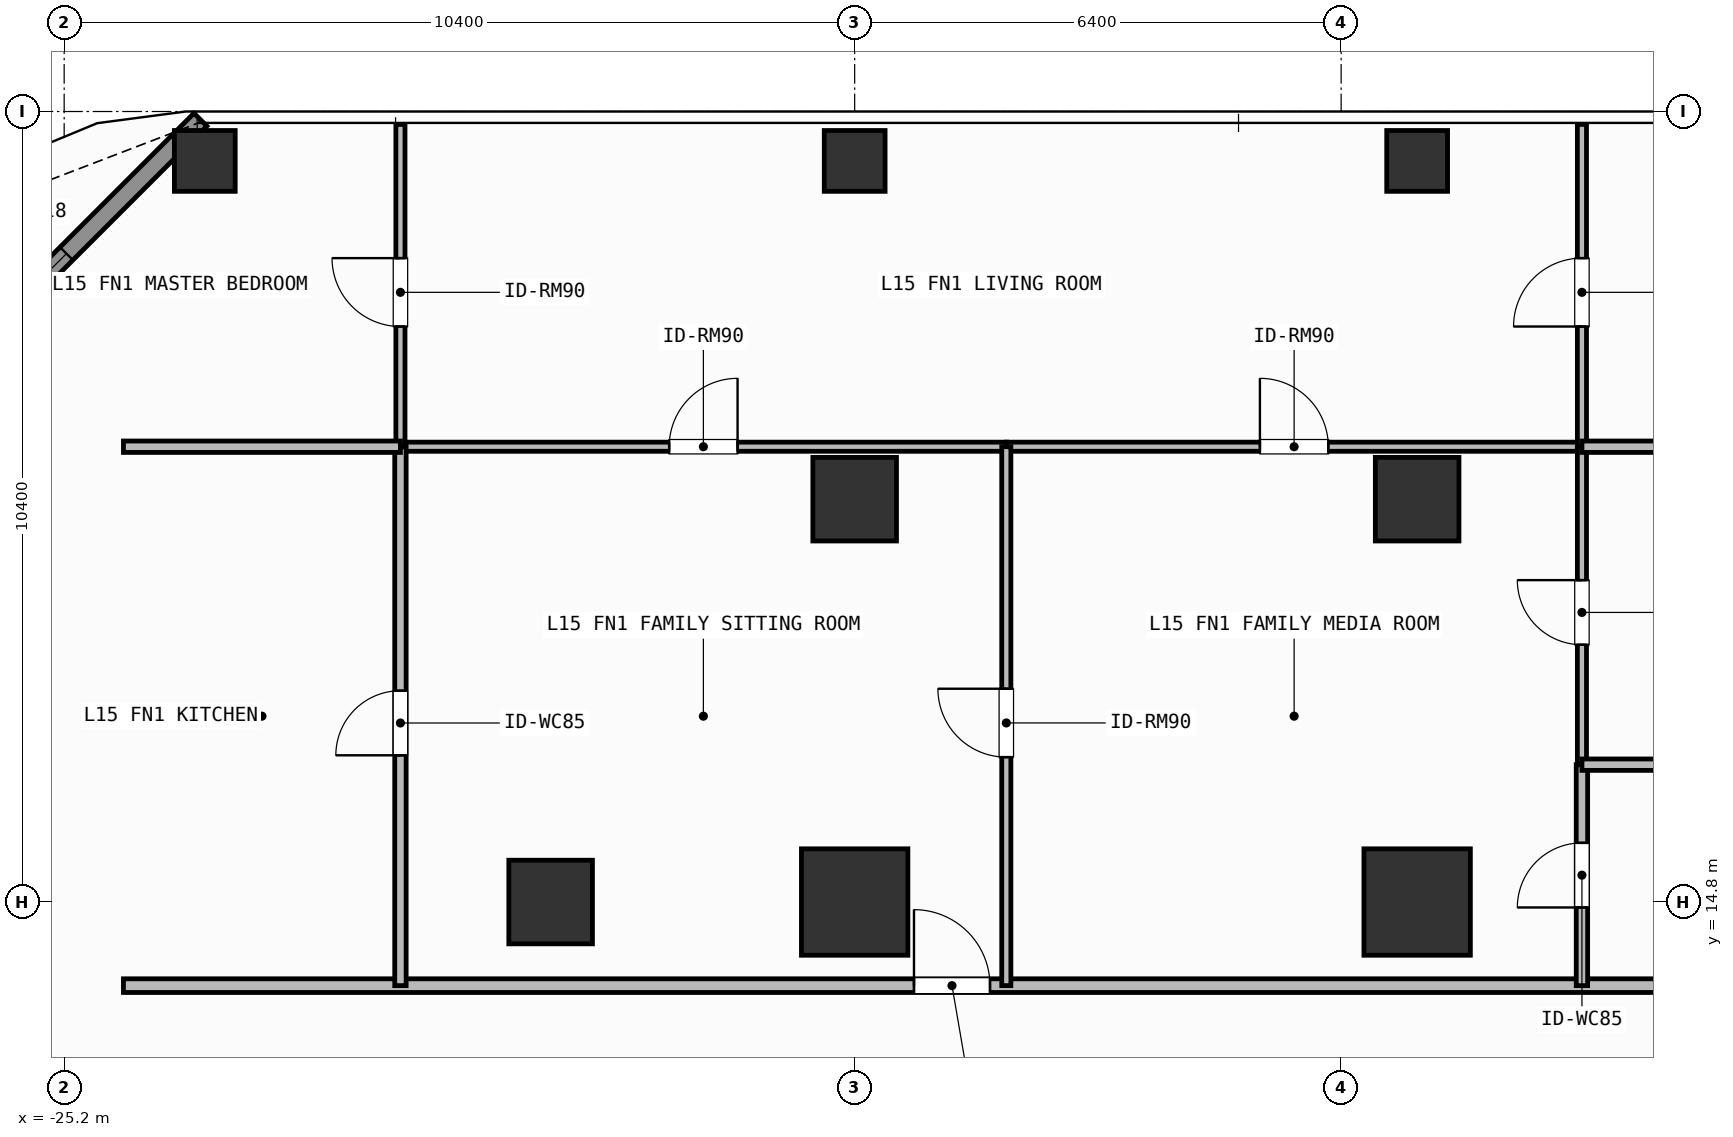
"""IFC4 building model, lengths in metres.
Left out: names, types, materials, properties, quantities, classifications, styles, units other than length and angle.
Written with IfcOpenShell. Run it as: python <this file> out.ifc"""

import sys

from ifc_helpers import new_model, si_unit, direction, frame, frame_2d, origin, origin_2d, place, context, subcontext, project, spatial, rectangle, hollow_rectangle, extrude, element, fill, save


model = new_model("IFC4")
c1 = context("Model", 3, precision=1e-05, world=origin(), true_north=direction((0.0, 1.0)))
c2 = subcontext(c1, "Body", "Model", "MODEL_VIEW")
j1 = project(units=[si_unit("LENGTHUNIT", "METRE"), si_unit("PLANEANGLEUNIT", "RADIAN")], contexts=[c1])
p1 = place(None, origin())
s1 = spatial("IfcSite", under=j1, at=p1, CompositionType="ELEMENT")
p2 = place(p1, origin())
s2 = spatial("IfcBuilding", under=s1, at=p2, CompositionType="ELEMENT")
p3 = place(p2, frame((0.0, 0.0, 57.9)))
s3 = spatial("IfcBuildingStorey", under=s2, at=p3, CompositionType="ELEMENT", Elevation=57.9)
for number, where, z_axis, x_axis in (
    (1, (-14.8, 14.8, 0.0), (0.0, 0.0, 1.0), (1.0, 0.0, 0.0)),
    (2, (-7.4, 14.8, 0.0), (0.0, 0.0, 1.0), (1.0, 0.0, 0.0)),
):
    element("IfcColumn", number, at=place(p3, frame(where, z_axis=z_axis, x_axis=x_axis)), inside=s3, PredefinedType="COLUMN", context=c2, shape_type="SweptSolid", body=[
        extrude(rectangle(XDim=1.4, YDim=1.4, at=origin_2d()), origin(), (0.0, 0.0, 1.0), 3.9),
    ])
for number, where, z_axis, x_axis in (
    (3, (-18.8, 14.8, 0.0), (0.0, 0.0, 1.0), (1.0, 0.0, 0.0)),
    (4, (-14.8, 20.1, 0.0), (0.0, 0.0, 1.0), (1.0, 0.0, 0.0)),
    (5, (-7.4, 20.1, 0.0), (0.0, 0.0, 1.0), (1.0, 0.0, 0.0)),
):
    element("IfcColumn", number, at=place(p3, frame(where, z_axis=z_axis, x_axis=x_axis)), inside=s3, PredefinedType="COLUMN", context=c2, shape_type="SweptSolid", body=[
        extrude(rectangle(XDim=1.1, YDim=1.1, at=origin_2d()), origin(), (0.0, 0.0, 1.0), 3.9),
    ])
for number, where, z_axis, x_axis in (
    (6, (-23.35, 24.55, 0.0), (0.0, 0.0, 1.0), (1.0, 0.0, 0.0)),
    (7, (-14.8, 24.55, 0.0), (0.0, 0.0, 1.0), (1.0, 0.0, 0.0)),
    (8, (-7.4, 24.55, 0.0), (0.0, 0.0, 1.0), (1.0, 0.0, 0.0)),
):
    element("IfcColumn", number, at=place(p3, frame(where, z_axis=z_axis, x_axis=x_axis)), inside=s3, PredefinedType="COLUMN", context=c2, shape_type="SweptSolid", body=[
        extrude(hollow_rectangle(XDim=0.8, YDim=0.8, WallThickness=0.036, at=origin_2d()), origin(), (0.0, 0.0, 1.0), 3.9),
    ])
p4 = place(p3, frame((-27.992, 20.508, 0.0), z_axis=(0.0, 0.0, 1.0), x_axis=(0.707106781187, 0.707106781187, 0.0)))
e9 = element("IfcWall", 9, at=p4, inside=s3, PredefinedType="SOLIDWALL", context=c2, shape_type="SweptSolid", body=[
    extrude(rectangle(XDim=6.484, YDim=0.24, at=frame_2d((3.242, 0.0))), origin(), (0.0, 0.0, 1.0), 3.68),
])
p5 = place(p4, frame((2.492, 0.0, 0.8)))
e10 = element("IfcOpeningElement", 10, at=p5, cuts=e9, PredefinedType="OPENING", context=c2, shape_type="SweptSolid", body=[
    extrude(rectangle(XDim=1.5, YDim=1.85, at=frame_2d((0.75, 0.925))), frame((0.0, 0.13, 0.0), z_axis=(0.0, -1.0, 0.0), x_axis=(1.0, 0.0, 0.0)), (0.0, 0.0, 1.0), 0.26),
])
p6 = place(p3, frame((-24.42, 13.7, 0.0), z_axis=(0.0, 0.0, 1.0), x_axis=(1.0, 0.0, 0.0)))
e11 = element("IfcWall", 11, at=p6, inside=s3, PredefinedType="PARTITIONING", context=c2, shape_type="SweptSolid", body=[
    extrude(rectangle(XDim=25.394, YDim=0.18, at=frame_2d((12.697, 0.0))), origin(), (0.0, 0.0, 1.0), 3.68),
])
p7 = place(p6, frame((10.4, 0.0, 0.0)))
e12 = element("IfcOpeningElement", 12, at=p7, cuts=e11, PredefinedType="OPENING", context=c2, shape_type="SweptSolid", body=[
    extrude(rectangle(XDim=1.0, YDim=2.2, at=frame_2d((0.5, 1.1))), frame((0.0, 0.1, 0.0), z_axis=(0.0, -1.0, 0.0), x_axis=(1.0, 0.0, 0.0)), (0.0, 0.0, 1.0), 0.2),
])
p8 = place(p3, frame((-20.776, 20.79, 0.0), z_axis=(0.0, 0.0, 1.0), x_axis=(1.0, 0.0, 0.0)))
e13 = element("IfcWall", 13, at=p8, inside=s3, PredefinedType="PARTITIONING", context=c2, shape_type="SweptSolid", body=[
    extrude(rectangle(XDim=7.971, YDim=0.12, at=frame_2d((3.985, 0.0))), origin(), (0.0, 0.0, 1.0), 3.68),
])
p9 = place(p8, frame((3.535, 0.0, 0.0)))
e14 = element("IfcOpeningElement", 14, at=p9, cuts=e13, PredefinedType="OPENING", context=c2, shape_type="SweptSolid", body=[
    extrude(rectangle(XDim=0.9, YDim=2.1, at=frame_2d((0.45, 1.05))), frame((0.0, 0.07, 0.0), z_axis=(0.0, -1.0, 0.0), x_axis=(1.0, 0.0, 0.0)), (0.0, 0.0, 1.0), 0.14),
])
p10 = place(p3, frame((-12.805, 20.79, 0.0), z_axis=(0.0, 0.0, 1.0), x_axis=(1.0, 0.0, 0.0)))
e15 = element("IfcWall", 15, at=p10, inside=s3, PredefinedType="PARTITIONING", context=c2, shape_type="SweptSolid", body=[
    extrude(rectangle(XDim=7.573, YDim=0.12, at=frame_2d((3.787, 0.0))), origin(), (0.0, 0.0, 1.0), 3.68),
])
p11 = place(p10, frame((3.336, 0.0, 0.0)))
e16 = element("IfcOpeningElement", 16, at=p11, cuts=e15, PredefinedType="OPENING", context=c2, shape_type="SweptSolid", body=[
    extrude(rectangle(XDim=0.9, YDim=2.1, at=frame_2d((0.45, 1.05))), frame((0.0, 0.07, 0.0), z_axis=(0.0, -1.0, 0.0), x_axis=(1.0, 0.0, 0.0)), (0.0, 0.0, 1.0), 0.14),
])
p12 = place(p3, frame((-12.805, 13.7, 0.0), z_axis=(0.0, 0.0, 1.0), x_axis=(0.0, 1.0, 0.0)))
e17 = element("IfcWall", 17, at=p12, inside=s3, PredefinedType="PARTITIONING", context=c2, shape_type="SweptSolid", body=[
    extrude(rectangle(XDim=7.09, YDim=0.12, at=frame_2d((3.545, 0.0))), origin(), (0.0, 0.0, 1.0), 3.68),
])
p13 = place(p12, frame((3.006, 0.0, 0.0)))
e18 = element("IfcOpeningElement", 18, at=p13, cuts=e17, PredefinedType="OPENING", context=c2, shape_type="SweptSolid", body=[
    extrude(rectangle(XDim=0.9, YDim=2.1, at=frame_2d((0.45, 1.05))), frame((0.0, 0.07, 0.0), z_axis=(0.0, -1.0, 0.0), x_axis=(1.0, 0.0, 0.0)), (0.0, 0.0, 1.0), 0.14),
])
p14 = place(p3, frame((-20.776, 13.7, 0.0), z_axis=(0.0, 0.0, 1.0), x_axis=(0.0, 1.0, 0.0)))
e19 = element("IfcWall", 19, at=p14, inside=s3, PredefinedType="PARTITIONING", context=c2, shape_type="SweptSolid", body=[
    extrude(rectangle(XDim=7.09, YDim=0.15, at=frame_2d((3.545, 0.0))), origin(), (0.0, 0.0, 1.0), 3.68),
])
p15 = place(p14, frame((3.03, 0.0, 0.0)))
e20 = element("IfcOpeningElement", 20, at=p15, cuts=e19, PredefinedType="OPENING", context=c2, shape_type="SweptSolid", body=[
    extrude(rectangle(XDim=0.85, YDim=2.1, at=frame_2d((0.425, 1.05))), frame((0.0, 0.085, 0.0), z_axis=(0.0, -1.0, 0.0), x_axis=(1.0, 0.0, 0.0)), (0.0, 0.0, 1.0), 0.17),
])
p16 = place(p3, frame((-20.776, 20.79, 0.0), z_axis=(0.0, 0.0, 1.0), x_axis=(0.0, 1.0, 0.0)))
e21 = element("IfcWall", 21, at=p16, inside=s3, PredefinedType="PARTITIONING", context=c2, shape_type="SweptSolid", body=[
    extrude(rectangle(XDim=4.24, YDim=0.12, at=frame_2d((2.12, 0.0))), origin(), (0.0, 0.0, 1.0), 3.68),
])
p17 = place(p16, frame((1.581, 0.0, 0.0)))
e22 = element("IfcOpeningElement", 22, at=p17, cuts=e21, PredefinedType="OPENING", context=c2, shape_type="SweptSolid", body=[
    extrude(rectangle(XDim=0.9, YDim=2.1, at=frame_2d((0.45, 1.05))), frame((0.0, 0.07, 0.0), z_axis=(0.0, -1.0, 0.0), x_axis=(1.0, 0.0, 0.0)), (0.0, 0.0, 1.0), 0.14),
])
p18 = place(p3, frame((-5.232, 13.7, 0.0), z_axis=(0.0, 0.0, 1.0), x_axis=(0.0, 1.0, 0.0)))
e23 = element("IfcWall", 23, at=p18, inside=s3, PredefinedType="PARTITIONING", context=c2, shape_type="SweptSolid", body=[
    extrude(rectangle(XDim=2.907, YDim=0.15, at=frame_2d((1.454, 0.0))), origin(), (0.0, 0.0, 1.0), 3.68),
])
p19 = place(p18, frame((1.029, 0.0, 0.0)))
e24 = element("IfcOpeningElement", 24, at=p19, cuts=e23, PredefinedType="OPENING", context=c2, shape_type="SweptSolid", body=[
    extrude(rectangle(XDim=0.85, YDim=2.1, at=frame_2d((0.425, 1.05))), frame((0.0, 0.085, 0.0), z_axis=(0.0, -1.0, 0.0), x_axis=(1.0, 0.0, 0.0)), (0.0, 0.0, 1.0), 0.17),
])
p20 = place(p3, frame((-5.232, 16.607, 0.0), z_axis=(0.0, 0.0, 1.0), x_axis=(0.0, 1.0, 0.0)))
e25 = element("IfcWall", 25, at=p20, inside=s3, PredefinedType="PARTITIONING", context=c2, shape_type="SweptSolid", body=[
    extrude(rectangle(XDim=4.183, YDim=0.12, at=frame_2d((2.092, 0.0))), origin(), (0.0, 0.0, 1.0), 3.68),
])
p21 = place(p20, frame((1.578, 0.0, 0.0)))
e26 = element("IfcOpeningElement", 26, at=p21, cuts=e25, PredefinedType="OPENING", context=c2, shape_type="SweptSolid", body=[
    extrude(rectangle(XDim=0.85, YDim=2.1, at=frame_2d((0.425, 1.05))), frame((0.0, 0.07, 0.0), z_axis=(0.0, -1.0, 0.0), x_axis=(1.0, 0.0, 0.0)), (0.0, 0.0, 1.0), 0.14),
])
p22 = place(p3, frame((-5.232, 20.79, 0.0), z_axis=(0.0, 0.0, 1.0), x_axis=(0.0, 1.0, 0.0)))
e27 = element("IfcWall", 27, at=p22, inside=s3, PredefinedType="PARTITIONING", context=c2, shape_type="SweptSolid", body=[
    extrude(rectangle(XDim=4.24, YDim=0.12, at=frame_2d((2.12, 0.0))), origin(), (0.0, 0.0, 1.0), 3.68),
])
p23 = place(p22, frame((1.581, 0.0, 0.0)))
e28 = element("IfcOpeningElement", 28, at=p23, cuts=e27, PredefinedType="OPENING", context=c2, shape_type="SweptSolid", body=[
    extrude(rectangle(XDim=0.9, YDim=2.1, at=frame_2d((0.45, 1.05))), frame((0.0, 0.07, 0.0), z_axis=(0.0, -1.0, 0.0), x_axis=(1.0, 0.0, 0.0)), (0.0, 0.0, 1.0), 0.14),
])
p24 = place(p3, frame((-24.42, 20.79, 0.0), z_axis=(0.0, 0.0, 1.0), x_axis=(1.0, 0.0, 0.0)))
e29 = element("IfcWall", 29, at=p24, inside=s3, PredefinedType="PARTITIONING", context=c2, shape_type="SweptSolid", body=[
    extrude(rectangle(XDim=3.644, YDim=0.15, at=frame_2d((1.822, 0.0))), origin(), (0.0, 0.0, 1.0), 3.68),
])
for number, where, z_axis, x_axis in (
    (30, (-5.232, 16.607, 0.0), (0.0, 0.0, 1.0), (1.0, 0.0, 0.0)),
    (31, (-5.232, 20.79, 0.0), (0.0, 0.0, 1.0), (1.0, 0.0, 0.0)),
):
    element("IfcWall", number, at=place(p3, frame(where, z_axis=z_axis, x_axis=x_axis)), inside=s3, PredefinedType="PARTITIONING", context=c2, shape_type="SweptSolid", body=[
        extrude(rectangle(XDim=6.206, YDim=0.15, at=frame_2d((3.103, 0.0))), origin(), (0.0, 0.0, 1.0), 3.68),
    ])
p25 = place(p5, origin())
e32 = element("IfcWindow", 32, at=p25, inside=s3, PartitioningType="SINGLE_PANEL", PredefinedType="WINDOW", context=c2, shape_type="SweptSolid", body=[
    extrude(rectangle(XDim=1.5, YDim=1.85, at=frame_2d((0.75, 0.925))), frame((0.0, 0.03, 0.0), z_axis=(0.0, -1.0, 0.0), x_axis=(1.0, 0.0, 0.0)), (0.0, 0.0, 1.0), 0.06),
])
fill(e10, e32)
p26 = place(p7, origin())
e33 = element("IfcDoor", 33, at=p26, inside=s3, OperationType="SINGLE_SWING_LEFT", PredefinedType="DOOR", context=c2, shape_type="SweptSolid", body=[
    extrude(rectangle(XDim=1.0, YDim=2.2, at=frame_2d((0.5, 1.1))), frame((0.0, 0.025, 0.0), z_axis=(0.0, -1.0, 0.0), x_axis=(1.0, 0.0, 0.0)), (0.0, 0.0, 1.0), 0.05),
])
fill(e12, e33)
p27 = place(p9, origin())
e34 = element("IfcDoor", 34, at=p27, inside=s3, OperationType="SINGLE_SWING_RIGHT", PredefinedType="DOOR", context=c2, shape_type="SweptSolid", body=[
    extrude(rectangle(XDim=0.9, YDim=2.1, at=frame_2d((0.45, 1.05))), frame((0.0, 0.025, 0.0), z_axis=(0.0, -1.0, 0.0), x_axis=(1.0, 0.0, 0.0)), (0.0, 0.0, 1.0), 0.05),
])
fill(e14, e34)
p28 = place(p11, origin())
e35 = element("IfcDoor", 35, at=p28, inside=s3, OperationType="SINGLE_SWING_LEFT", PredefinedType="DOOR", context=c2, shape_type="SweptSolid", body=[
    extrude(rectangle(XDim=0.9, YDim=2.1, at=frame_2d((0.45, 1.05))), frame((0.0, 0.025, 0.0), z_axis=(0.0, -1.0, 0.0), x_axis=(1.0, 0.0, 0.0)), (0.0, 0.0, 1.0), 0.05),
])
fill(e16, e35)
p29 = place(p13, origin())
e36 = element("IfcDoor", 36, at=p29, inside=s3, OperationType="SINGLE_SWING_RIGHT", PredefinedType="DOOR", context=c2, shape_type="SweptSolid", body=[
    extrude(rectangle(XDim=0.9, YDim=2.1, at=frame_2d((0.45, 1.05))), frame((0.0, 0.025, 0.0), z_axis=(0.0, -1.0, 0.0), x_axis=(1.0, 0.0, 0.0)), (0.0, 0.0, 1.0), 0.05),
])
fill(e18, e36)
p30 = place(p15, origin())
e37 = element("IfcDoor", 37, at=p30, inside=s3, OperationType="SINGLE_SWING_LEFT", PredefinedType="DOOR", context=c2, shape_type="SweptSolid", body=[
    extrude(rectangle(XDim=0.85, YDim=2.1, at=frame_2d((0.425, 1.05))), frame((0.0, 0.025, 0.0), z_axis=(0.0, -1.0, 0.0), x_axis=(1.0, 0.0, 0.0)), (0.0, 0.0, 1.0), 0.05),
])
fill(e20, e37)
p31 = place(p17, origin())
e38 = element("IfcDoor", 38, at=p31, inside=s3, OperationType="SINGLE_SWING_RIGHT", PredefinedType="DOOR", context=c2, shape_type="SweptSolid", body=[
    extrude(rectangle(XDim=0.9, YDim=2.1, at=frame_2d((0.45, 1.05))), frame((0.0, 0.025, 0.0), z_axis=(0.0, -1.0, 0.0), x_axis=(1.0, 0.0, 0.0)), (0.0, 0.0, 1.0), 0.05),
])
fill(e22, e38)
p32 = place(p19, origin())
e39 = element("IfcDoor", 39, at=p32, inside=s3, OperationType="SINGLE_SWING_LEFT", PredefinedType="DOOR", context=c2, shape_type="SweptSolid", body=[
    extrude(rectangle(XDim=0.85, YDim=2.1, at=frame_2d((0.425, 1.05))), frame((0.0, 0.025, 0.0), z_axis=(0.0, -1.0, 0.0), x_axis=(1.0, 0.0, 0.0)), (0.0, 0.0, 1.0), 0.05),
])
fill(e24, e39)
p33 = place(p21, origin())
e40 = element("IfcDoor", 40, at=p33, inside=s3, OperationType="SINGLE_SWING_RIGHT", PredefinedType="DOOR", context=c2, shape_type="SweptSolid", body=[
    extrude(rectangle(XDim=0.85, YDim=2.1, at=frame_2d((0.425, 1.05))), frame((0.0, 0.025, 0.0), z_axis=(0.0, -1.0, 0.0), x_axis=(1.0, 0.0, 0.0)), (0.0, 0.0, 1.0), 0.05),
])
fill(e26, e40)
p34 = place(p23, origin())
e41 = element("IfcDoor", 41, at=p34, inside=s3, OperationType="SINGLE_SWING_LEFT", PredefinedType="DOOR", context=c2, shape_type="SweptSolid", body=[
    extrude(rectangle(XDim=0.9, YDim=2.1, at=frame_2d((0.45, 1.05))), frame((0.0, 0.025, 0.0), z_axis=(0.0, -1.0, 0.0), x_axis=(1.0, 0.0, 0.0)), (0.0, 0.0, 1.0), 0.05),
])
fill(e28, e41)
save(model, sys.argv[1])
